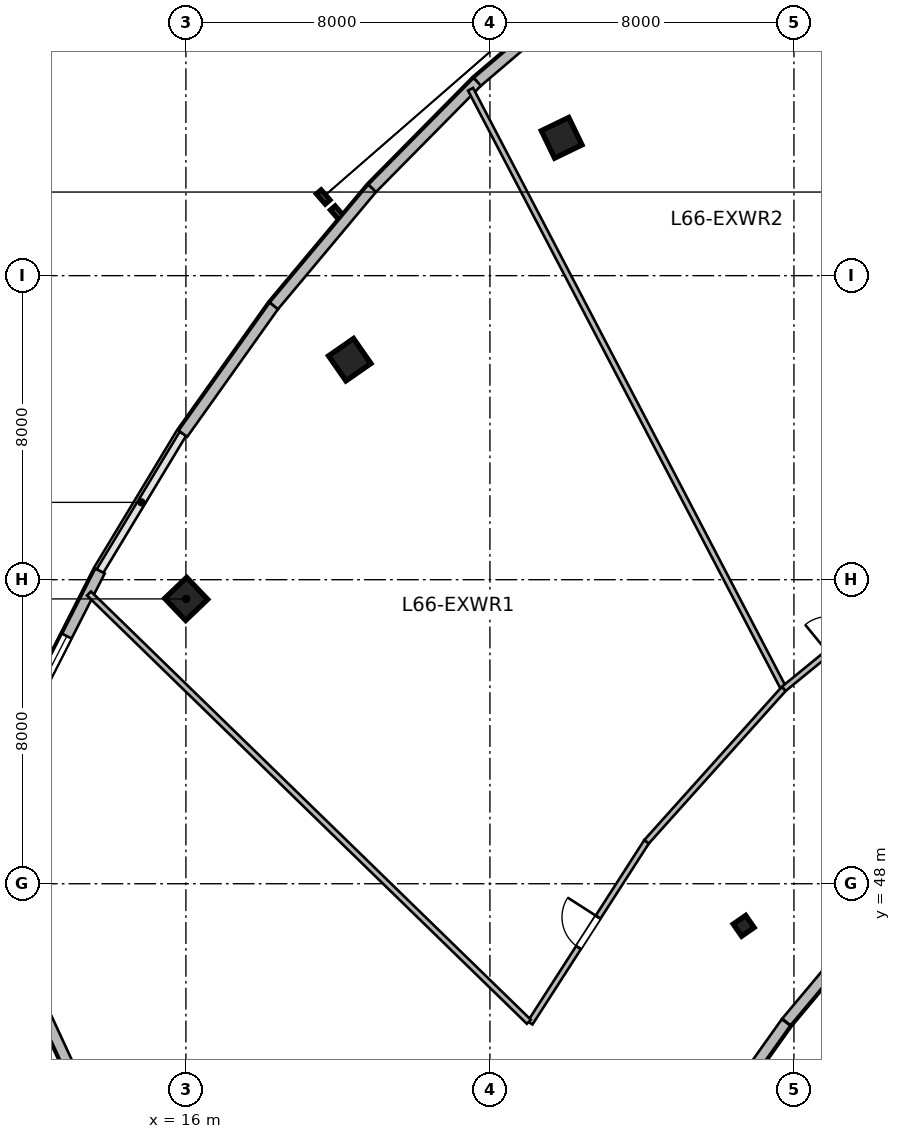
"""IFC4 building model, lengths in metres.
Left out: names, types, materials, properties, quantities, classifications, styles, units other than length and angle.
Written with IfcOpenShell. Run it as: python <this file> out.ifc"""

import sys

from ifc_helpers import new_model, si_unit, direction, frame, frame_2d, origin, origin_2d, place, context, subcontext, project, spatial, rectangle, i_section, extrude, source, transform, mapped, element, fill, save


model = new_model("IFC4")
c1 = context("Model", 3, precision=1e-05, world=origin(), true_north=direction((0.0, 1.0)))
c2 = subcontext(c1, "Body", "Model", "MODEL_VIEW")
j1 = project(units=[si_unit("LENGTHUNIT", "METRE"), si_unit("PLANEANGLEUNIT", "RADIAN")], contexts=[c1])
p1 = place(None, origin())
s1 = spatial("IfcSite", under=j1, at=p1, CompositionType="ELEMENT")
p2 = place(p1, origin())
s2 = spatial("IfcBuilding", under=s1, at=p2, CompositionType="ELEMENT")
p3 = place(p2, frame((0.0, 0.0, 271.8)))
s3 = spatial("IfcBuildingStorey", under=s2, at=p3, CompositionType="ELEMENT", Elevation=271.8)
m1 = source(origin(), c2, "Body", "SweptSolid", [
    extrude(rectangle(XDim=0.8, YDim=0.8, at=origin_2d()), origin(), (0.0, 0.0, 1.0), 3.9),
])
p4 = place(p3, frame((16.007, 55.494, 0.0), z_axis=(0.0, 0.0, 1.0), x_axis=(-0.690756218984, 0.723087716626, 0.0)))
e1 = element("IfcColumn", 1, at=p4, inside=s3, PredefinedType="COLUMN", context=c2, shape_type="MappedRepresentation", body=[
    mapped(m1, transform((0.0, 0.0, 0.0), scale=1.0)),
])
m2 = source(origin(), c2, "Body", "SweptSolid", [
    extrude(i_section(OverallWidth=0.399, OverallDepth=0.387, WebThickness=0.021, FlangeThickness=0.033, at=origin_2d()), origin(), (0.0, 0.0, 1.0), 3.9),
])
p5 = place(p3, frame((30.677, 46.892, 0.0), z_axis=(0.0, 0.0, 1.0), x_axis=(-0.571143442153, 0.820850271661, 0.0)))
e2 = element("IfcColumn", 2, at=p5, inside=s3, PredefinedType="COLUMN", context=c2, shape_type="MappedRepresentation", body=[
    mapped(m2, transform((0.0, 0.0, 0.0), scale=1.0)),
])
for number, where, z_axis, x_axis in (
    (3, (20.311, 61.789, 0.0), (0.0, 0.0, 1.0), (-0.571, 0.821, 0.0)),
    (4, (25.888, 67.627, 0.0), (0.0, 0.0, 1.0), (-0.436, 0.9, 0.0)),
):
    element("IfcColumn", number, at=place(p3, frame(where, z_axis=z_axis, x_axis=x_axis)), inside=s3, PredefinedType="COLUMN", context=c2, shape_type="MappedRepresentation", body=[
        mapped(m1, transform((0.0, 0.0, 0.0), scale=1.0)),
    ])
m3 = source(origin(), c2, "Body", "SweptSolid", [
    extrude(rectangle(XDim=2.18, YDim=0.28, at=frame_2d((1.09, 0.0))), origin(), (0.0, 0.0, 1.0), 3.64),
])
p6 = place(p3, frame((33.2, 46.035, 0.0), z_axis=(0.0, 0.0, 1.0), x_axis=(-0.641835571889, -0.766842290603, 0.0)))
e5 = element("IfcWall", 5, at=p6, inside=s3, PredefinedType="SOLIDWALL", context=c2, shape_type="MappedRepresentation", body=[
    mapped(m3, transform((0.0, 0.0, 0.0), scale=1.0)),
])
m4 = source(origin(), c2, "Body", "SweptSolid", [
    extrude(rectangle(XDim=2.231, YDim=0.28, at=frame_2d((1.116, 0.0))), origin(), (0.0, 0.0, 1.0), 3.64),
])
p7 = place(p3, frame((31.792, 44.352, 0.0), z_axis=(0.0, 0.0, 1.0), x_axis=(-0.579622296598, -0.814885263879, 0.0)))
e6 = element("IfcWall", 6, at=p7, inside=s3, PredefinedType="SOLIDWALL", context=c2, shape_type="MappedRepresentation", body=[
    mapped(m4, transform((0.0, 0.0, 0.0), scale=1.0)),
])
m5 = source(origin(), c2, "Body", "SweptSolid", [
    extrude(rectangle(XDim=6.837, YDim=0.28, at=frame_2d((3.418, 0.0))), origin(), (0.0, 0.0, 1.0), 3.64),
])
p8 = place(p3, frame((14.184, 40.464, 0.0), z_axis=(0.0, 0.0, 1.0), x_axis=(-0.419621957862, 0.907698965781, 0.0)))
e7 = element("IfcWall", 7, at=p8, inside=s3, PredefinedType="SOLIDWALL", context=c2, shape_type="MappedRepresentation", body=[
    mapped(m5, transform((0.0, 0.0, 0.0), scale=1.0)),
])
p9 = place(p8, frame((0.609, 0.0, 0.95)))
e8 = element("IfcOpeningElement", 8, at=p9, cuts=e7, PredefinedType="OPENING", context=c2, shape_type="SweptSolid", body=[
    extrude(rectangle(XDim=2.2, YDim=2.1, at=frame_2d((1.1, 1.05))), frame((0.0, 0.15, 0.0), z_axis=(0.0, -1.0, 0.0), x_axis=(1.0, 0.0, 0.0)), (0.0, 0.0, 1.0), 0.3),
])
m6 = source(origin(), c2, "Body", "SweptSolid", [
    extrude(rectangle(XDim=4.281, YDim=0.28, at=frame_2d((2.141, 0.0))), origin(), (0.0, 0.0, 1.0), 3.64),
])
p10 = place(p3, frame((11.795, 52.413, 0.0), z_axis=(0.0, 0.0, 1.0), x_axis=(0.454020597637, 0.890991187903, 0.0)))
e9 = element("IfcWall", 9, at=p10, inside=s3, PredefinedType="SOLIDWALL", context=c2, shape_type="MappedRepresentation", body=[
    mapped(m6, transform((0.0, 0.0, 0.0), scale=1.0)),
])
p11 = place(p10, frame((0.16, 0.0, 0.95)))
e10 = element("IfcOpeningElement", 10, at=p11, cuts=e9, PredefinedType="OPENING", context=c2, shape_type="SweptSolid", body=[
    extrude(rectangle(XDim=2.2, YDim=2.1, at=frame_2d((1.1, 1.05))), frame((0.0, 0.15, 0.0), z_axis=(0.0, -1.0, 0.0), x_axis=(1.0, 0.0, 0.0)), (0.0, 0.0, 1.0), 0.3),
])
m7 = source(origin(), c2, "Body", "SweptSolid", [
    extrude(rectangle(XDim=4.129, YDim=0.28, at=frame_2d((2.065, 0.0))), origin(), (0.0, 0.0, 1.0), 3.64),
])
p12 = place(p3, frame((15.921, 59.842, 0.0), z_axis=(0.0, 0.0, 1.0), x_axis=(0.57959272029, 0.814906300495, 0.0)))
e11 = element("IfcWall", 11, at=p12, inside=s3, PredefinedType="SOLIDWALL", context=c2, shape_type="MappedRepresentation", body=[
    mapped(m7, transform((0.0, 0.0, 0.0), scale=1.0)),
])
m8 = source(origin(), c2, "Body", "SweptSolid", [
    extrude(rectangle(XDim=4.033, YDim=0.28, at=frame_2d((2.017, 0.0))), origin(), (0.0, 0.0, 1.0), 3.64),
])
p13 = place(p3, frame((18.315, 63.207, 0.0), z_axis=(0.0, 0.0, 1.0), x_axis=(0.641778577123, 0.766889990772, 0.0)))
e12 = element("IfcWall", 12, at=p13, inside=s3, PredefinedType="SOLIDWALL", context=c2, shape_type="MappedRepresentation", body=[
    mapped(m8, transform((0.0, 0.0, 0.0), scale=1.0)),
])
m9 = source(origin(), c2, "Body", "SweptSolid", [
    extrude(rectangle(XDim=3.937, YDim=0.28, at=frame_2d((1.968, 0.0))), origin(), (0.0, 0.0, 1.0), 3.64),
])
p14 = place(p3, frame((20.903, 66.3, 0.0), z_axis=(0.0, 0.0, 1.0), x_axis=(0.702690019653, 0.711496125274, 0.0)))
e13 = element("IfcWall", 13, at=p14, inside=s3, PredefinedType="SOLIDWALL", context=c2, shape_type="MappedRepresentation", body=[
    mapped(m9, transform((0.0, 0.0, 0.0), scale=1.0)),
])
m10 = source(origin(), c2, "Body", "SweptSolid", [
    extrude(rectangle(XDim=3.843, YDim=0.28, at=frame_2d((1.921, 0.0))), origin(), (0.0, 0.0, 1.0), 3.64),
])
p15 = place(p3, frame((23.67, 69.101, 0.0), z_axis=(0.0, 0.0, 1.0), x_axis=(0.761508028279, 0.648155477387, 0.0)))
e14 = element("IfcWall", 14, at=p15, inside=s3, PredefinedType="SOLIDWALL", context=c2, shape_type="MappedRepresentation", body=[
    mapped(m10, transform((0.0, 0.0, 0.0), scale=1.0)),
])
m11 = source(origin(), c2, "Body", "SweptSolid", [
    extrude(rectangle(XDim=5.668, YDim=0.15, at=frame_2d((2.834, 0.0))), origin(), (0.0, 0.0, 1.0), 3.64),
])
p16 = place(p3, frame((25.056, 44.337, 0.0), z_axis=(0.0, 0.0, 1.0), x_axis=(0.540868603668, 0.841107099938, 0.0)))
e15 = element("IfcWall", 15, at=p16, inside=s3, PredefinedType="PARTITIONING", context=c2, shape_type="MappedRepresentation", body=[
    mapped(m11, transform((0.0, 0.0, 0.0), scale=1.0)),
])
p17 = place(p16, frame((2.359, 0.0, 0.0)))
e16 = element("IfcOpeningElement", 16, at=p17, cuts=e15, PredefinedType="OPENING", context=c2, shape_type="SweptSolid", body=[
    extrude(rectangle(XDim=0.95, YDim=2.1, at=frame_2d((0.475, 1.05))), frame((0.0, 0.085, 0.0), z_axis=(0.0, -1.0, 0.0), x_axis=(1.0, 0.0, 0.0)), (0.0, 0.0, 1.0), 0.17),
])
m12 = source(origin(), c2, "Body", "SweptSolid", [
    extrude(rectangle(XDim=5.407, YDim=0.15, at=frame_2d((2.704, 0.0))), origin(), (0.0, 0.0, 1.0), 3.64),
])
p18 = place(p3, frame((28.122, 49.105, 0.0), z_axis=(0.0, 0.0, 1.0), x_axis=(0.667851383423, 0.744294652447, 0.0)))
e17 = element("IfcWall", 17, at=p18, inside=s3, PredefinedType="PARTITIONING", context=c2, shape_type="MappedRepresentation", body=[
    mapped(m12, transform((0.0, 0.0, 0.0), scale=1.0)),
])
m13 = source(origin(), c2, "Body", "SweptSolid", [
    extrude(rectangle(XDim=16.154, YDim=0.15, at=frame_2d((8.077, 0.0))), origin(), (0.0, 0.0, 1.0), 3.64),
])
p19 = place(p3, frame((25.024, 44.369, 0.0), z_axis=(0.0, 0.0, 1.0), x_axis=(-0.716519492877, 0.697567069412, 0.0)))
e18 = element("IfcWall", 18, at=p19, inside=s3, PredefinedType="PARTITIONING", context=c2, shape_type="MappedRepresentation", body=[
    mapped(m13, transform((0.0, 0.0, 0.0), scale=1.0)),
])
m14 = source(origin(), c2, "Body", "SweptSolid", [
    extrude(rectangle(XDim=17.75, YDim=0.15, at=frame_2d((8.875, 0.0))), origin(), (0.0, 0.0, 1.0), 3.64),
])
p20 = place(p3, frame((31.71, 53.174, 0.0), z_axis=(0.0, 0.0, 1.0), x_axis=(-0.463130463827, 0.886290118119, 0.0)))
e19 = element("IfcWall", 19, at=p20, inside=s3, PredefinedType="PARTITIONING", context=c2, shape_type="MappedRepresentation", body=[
    mapped(m14, transform((0.0, 0.0, 0.0), scale=1.0)),
])
m15 = source(origin(), c2, "Body", "SweptSolid", [
    extrude(rectangle(XDim=3.954, YDim=0.15, at=frame_2d((1.977, 0.0))), origin(), (0.0, 0.0, 1.0), 3.64),
])
p21 = place(p3, frame((31.733, 53.13, 0.0), z_axis=(0.0, 0.0, 1.0), x_axis=(0.774345047596, 0.632763579281, 0.0)))
e20 = element("IfcWall", 20, at=p21, inside=s3, PredefinedType="PARTITIONING", context=c2, shape_type="MappedRepresentation", body=[
    mapped(m15, transform((0.0, 0.0, 0.0), scale=1.0)),
])
p22 = place(p21, frame((1.502, 0.0, 0.0)))
e21 = element("IfcOpeningElement", 21, at=p22, cuts=e20, PredefinedType="OPENING", context=c2, shape_type="SweptSolid", body=[
    extrude(rectangle(XDim=0.95, YDim=2.1, at=frame_2d((0.475, 1.05))), frame((0.0, 0.085, 0.0), z_axis=(0.0, -1.0, 0.0), x_axis=(1.0, 0.0, 0.0)), (0.0, 0.0, 1.0), 0.17),
])
m16 = source(origin(), c2, "Body", "SweptSolid", [
    extrude(rectangle(XDim=2.2, YDim=2.1, at=frame_2d((1.1, 1.05))), frame((0.0, 0.03, 0.0), z_axis=(0.0, -1.0, 0.0), x_axis=(1.0, 0.0, 0.0)), (0.0, 0.0, 1.0), 0.06),
])
p23 = place(p11, origin())
e22 = element("IfcWindow", 22, at=p23, inside=s3, PartitioningType="TRIPLE_PANEL_VERTICAL", PredefinedType="WINDOW", context=c2, shape_type="MappedRepresentation", body=[
    mapped(m16, transform((0.0, 0.0, 0.0), scale=1.0)),
])
fill(e10, e22)
m17 = source(origin(), c2, "Body", "SweptSolid", [
    extrude(rectangle(XDim=0.95, YDim=2.1, at=frame_2d((0.475, 1.05))), frame((0.0, 0.025, 0.0), z_axis=(0.0, -1.0, 0.0), x_axis=(1.0, 0.0, 0.0)), (0.0, 0.0, 1.0), 0.05),
])
p24 = place(p17, origin())
e23 = element("IfcDoor", 23, at=p24, inside=s3, OperationType="SINGLE_SWING_RIGHT", PredefinedType="DOOR", context=c2, shape_type="MappedRepresentation", body=[
    mapped(m17, transform((0.0, 0.0, 0.0), scale=1.0)),
])
fill(e16, e23)
save(model, sys.argv[1])
